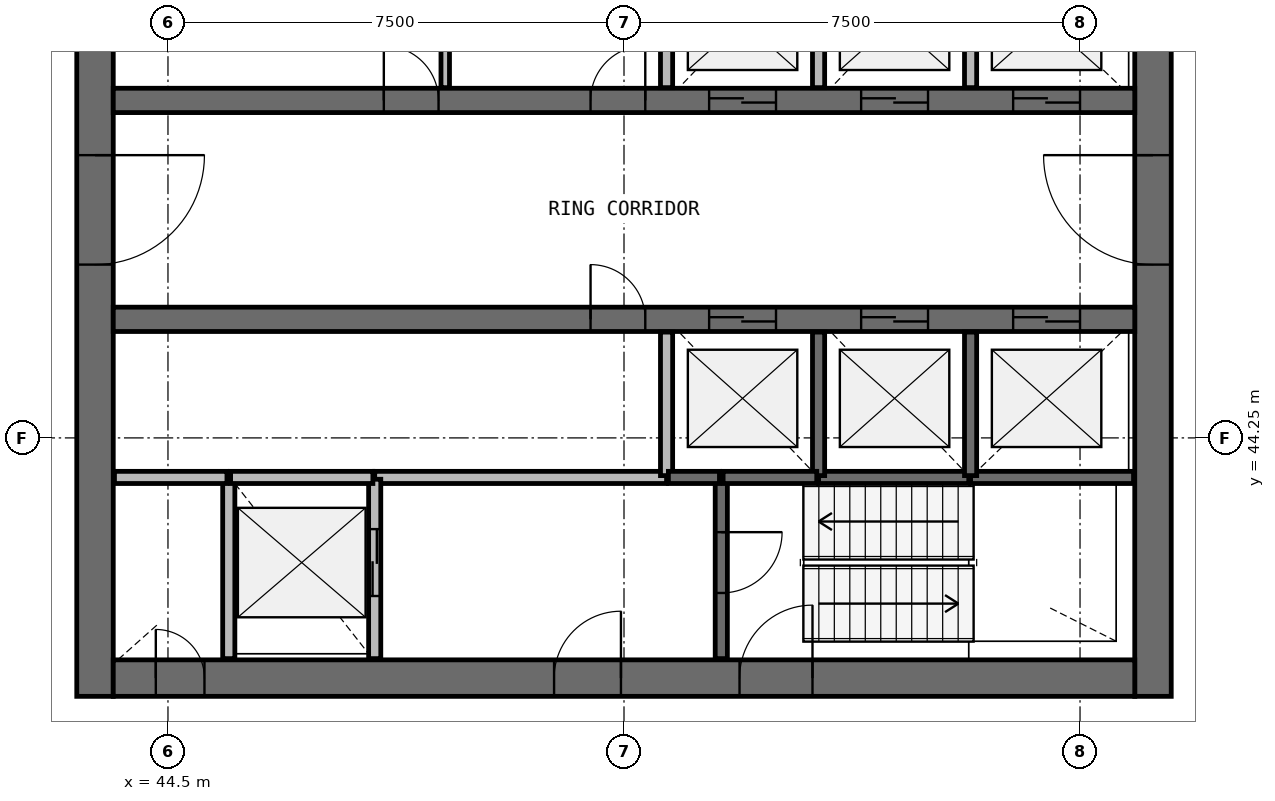
"""IFC4 building model, lengths in metres.
Left out: names, types, materials, properties, quantities, classifications, styles, units other than length and angle.
Written with IfcOpenShell. Run it as: python <this file> out.ifc"""

import sys

from ifc_helpers import new_model, si_unit, direction, frame, frame_2d, origin, place, context, subcontext, project, spatial, rectangle, extrude, source, transform, mapped, element, fill, save


model = new_model("IFC4")
c1 = context("Model", 3, precision=1e-05, world=origin(), true_north=direction((0.0, 1.0)))
c2 = subcontext(c1, "Body", "Model", "MODEL_VIEW")
j1 = project(units=[si_unit("LENGTHUNIT", "METRE"), si_unit("PLANEANGLEUNIT", "RADIAN")], contexts=[c1])
p1 = place(None, origin())
s1 = spatial("IfcSite", under=j1, at=p1, CompositionType="ELEMENT")
p2 = place(p1, origin())
s2 = spatial("IfcBuilding", under=s1, at=p2, CompositionType="ELEMENT")
p3 = place(p2, frame((0.0, 0.0, 183.8)))
s3 = spatial("IfcBuildingStorey", under=s2, at=p3, CompositionType="ELEMENT", Elevation=183.8)
p4 = place(p3, frame((60.7, 40.0, 0.0), z_axis=(0.0, 0.0, 1.0), x_axis=(0.0, 1.0, 0.0)))
e1 = element("IfcWall", 1, at=p4, inside=s3, PredefinedType="SHEAR", context=c2, shape_type="SweptSolid", body=[
    extrude(rectangle(XDim=16.0, YDim=0.6, at=frame_2d((8.0, 0.0))), origin(), (0.0, 0.0, 1.0), 3.9),
])
p5 = place(p4, frame((7.1, 0.0, 0.0)))
e2 = element("IfcOpeningElement", 2, at=p5, cuts=e1, PredefinedType="OPENING", context=c2, shape_type="SweptSolid", body=[
    extrude(rectangle(XDim=1.8, YDim=2.1, at=frame_2d((0.9, 1.05))), frame((0.0, 0.31, 0.0), z_axis=(0.0, -1.0, 0.0), x_axis=(1.0, 0.0, 0.0)), (0.0, 0.0, 1.0), 0.62),
])
p6 = place(p3, frame((43.3, 56.0, 0.0), z_axis=(0.0, 0.0, 1.0), x_axis=(0.0, -1.0, 0.0)))
e3 = element("IfcWall", 3, at=p6, inside=s3, PredefinedType="SHEAR", context=c2, shape_type="SweptSolid", body=[
    extrude(rectangle(XDim=16.0, YDim=0.6, at=frame_2d((8.0, 0.0))), origin(), (0.0, 0.0, 1.0), 3.9),
])
p7 = place(p6, frame((7.1, 0.0, 0.0)))
e4 = element("IfcOpeningElement", 4, at=p7, cuts=e3, PredefinedType="OPENING", context=c2, shape_type="SweptSolid", body=[
    extrude(rectangle(XDim=1.8, YDim=2.1, at=frame_2d((0.9, 1.05))), frame((0.0, 0.31, 0.0), z_axis=(0.0, -1.0, 0.0), x_axis=(1.0, 0.0, 0.0)), (0.0, 0.0, 1.0), 0.62),
])
p8 = place(p3, frame((43.6, 40.3, 0.0), z_axis=(0.0, 0.0, 1.0), x_axis=(1.0, 0.0, 0.0)))
e5 = element("IfcWall", 5, at=p8, inside=s3, PredefinedType="SHEAR", context=c2, shape_type="SweptSolid", body=[
    extrude(rectangle(XDim=16.8, YDim=0.6, at=frame_2d((8.4, 0.0))), origin(), (0.0, 0.0, 1.0), 3.9),
])
p9 = place(p8, frame((10.3, 0.0, 0.0)))
e6 = element("IfcOpeningElement", 6, at=p9, cuts=e5, PredefinedType="OPENING", context=c2, shape_type="SweptSolid", body=[
    extrude(rectangle(XDim=1.2, YDim=2.1, at=frame_2d((0.6, 1.05))), frame((0.0, 0.31, 0.0), z_axis=(0.0, -1.0, 0.0), x_axis=(1.0, 0.0, 0.0)), (0.0, 0.0, 1.0), 0.62),
])
p10 = place(p8, frame((7.25, 0.0, 0.0)))
e7 = element("IfcOpeningElement", 7, at=p10, cuts=e5, PredefinedType="OPENING", context=c2, shape_type="SweptSolid", body=[
    extrude(rectangle(XDim=1.1, YDim=2.1, at=frame_2d((0.55, 1.05))), frame((0.0, 0.31, 0.0), z_axis=(0.0, -1.0, 0.0), x_axis=(1.0, 0.0, 0.0)), (0.0, 0.0, 1.0), 0.62),
])
p11 = place(p8, frame((0.7, 0.0, 0.0)))
e8 = element("IfcOpeningElement", 8, at=p11, cuts=e5, PredefinedType="OPENING", context=c2, shape_type="SweptSolid", body=[
    extrude(rectangle(XDim=0.8, YDim=2.1, at=frame_2d((0.4, 1.05))), frame((0.0, 0.31, 0.0), z_axis=(0.0, -1.0, 0.0), x_axis=(1.0, 0.0, 0.0)), (0.0, 0.0, 1.0), 0.62),
])
p12 = place(p3, frame((43.6, 49.8, 0.0), z_axis=(0.0, 0.0, 1.0), x_axis=(1.0, 0.0, 0.0)))
e9 = element("IfcWall", 9, at=p12, inside=s3, PredefinedType="SHEAR", context=c2, shape_type="SweptSolid", body=[
    extrude(rectangle(XDim=16.8, YDim=0.4, at=frame_2d((8.4, 0.0))), origin(), (0.0, 0.0, 1.0), 3.9),
])
p13 = place(p12, frame((9.8, 0.0, 0.0)))
e10 = element("IfcOpeningElement", 10, at=p13, cuts=e9, PredefinedType="OPENING", context=c2, shape_type="SweptSolid", body=[
    extrude(rectangle(XDim=1.1, YDim=2.1, at=frame_2d((0.55, 1.05))), frame((0.0, 0.21, 0.0), z_axis=(0.0, -1.0, 0.0), x_axis=(1.0, 0.0, 0.0)), (0.0, 0.0, 1.0), 0.42),
])
p14 = place(p12, frame((12.3, 0.0, 0.0)))
e11 = element("IfcOpeningElement", 11, at=p14, cuts=e9, PredefinedType="OPENING", context=c2, shape_type="SweptSolid", body=[
    extrude(rectangle(XDim=1.1, YDim=2.1, at=frame_2d((0.55, 1.05))), frame((0.0, 0.21, 0.0), z_axis=(0.0, -1.0, 0.0), x_axis=(1.0, 0.0, 0.0)), (0.0, 0.0, 1.0), 0.42),
])
p15 = place(p12, frame((14.8, 0.0, 0.0)))
e12 = element("IfcOpeningElement", 12, at=p15, cuts=e9, PredefinedType="OPENING", context=c2, shape_type="SweptSolid", body=[
    extrude(rectangle(XDim=1.1, YDim=2.1, at=frame_2d((0.55, 1.05))), frame((0.0, 0.21, 0.0), z_axis=(0.0, -1.0, 0.0), x_axis=(1.0, 0.0, 0.0)), (0.0, 0.0, 1.0), 0.42),
])
p16 = place(p12, frame((4.45, 0.0, 0.0)))
e13 = element("IfcOpeningElement", 13, at=p16, cuts=e9, PredefinedType="OPENING", context=c2, shape_type="SweptSolid", body=[
    extrude(rectangle(XDim=0.9, YDim=2.1, at=frame_2d((0.45, 1.05))), frame((0.0, 0.21, 0.0), z_axis=(0.0, -1.0, 0.0), x_axis=(1.0, 0.0, 0.0)), (0.0, 0.0, 1.0), 0.42),
])
p17 = place(p12, frame((7.85, 0.0, 0.0)))
e14 = element("IfcOpeningElement", 14, at=p17, cuts=e9, PredefinedType="OPENING", context=c2, shape_type="SweptSolid", body=[
    extrude(rectangle(XDim=0.9, YDim=2.1, at=frame_2d((0.45, 1.05))), frame((0.0, 0.21, 0.0), z_axis=(0.0, -1.0, 0.0), x_axis=(1.0, 0.0, 0.0)), (0.0, 0.0, 1.0), 0.42),
])
p18 = place(p3, frame((43.6, 46.2, 0.0), z_axis=(0.0, 0.0, 1.0), x_axis=(1.0, 0.0, 0.0)))
e15 = element("IfcWall", 15, at=p18, inside=s3, PredefinedType="SHEAR", context=c2, shape_type="SweptSolid", body=[
    extrude(rectangle(XDim=16.8, YDim=0.4, at=frame_2d((8.4, 0.0))), origin(), (0.0, 0.0, 1.0), 3.9),
])
p19 = place(p18, frame((9.8, 0.0, 0.0)))
e16 = element("IfcOpeningElement", 16, at=p19, cuts=e15, PredefinedType="OPENING", context=c2, shape_type="SweptSolid", body=[
    extrude(rectangle(XDim=1.1, YDim=2.1, at=frame_2d((0.55, 1.05))), frame((0.0, 0.21, 0.0), z_axis=(0.0, -1.0, 0.0), x_axis=(1.0, 0.0, 0.0)), (0.0, 0.0, 1.0), 0.42),
])
p20 = place(p18, frame((12.3, 0.0, 0.0)))
e17 = element("IfcOpeningElement", 17, at=p20, cuts=e15, PredefinedType="OPENING", context=c2, shape_type="SweptSolid", body=[
    extrude(rectangle(XDim=1.1, YDim=2.1, at=frame_2d((0.55, 1.05))), frame((0.0, 0.21, 0.0), z_axis=(0.0, -1.0, 0.0), x_axis=(1.0, 0.0, 0.0)), (0.0, 0.0, 1.0), 0.42),
])
p21 = place(p18, frame((14.8, 0.0, 0.0)))
e18 = element("IfcOpeningElement", 18, at=p21, cuts=e15, PredefinedType="OPENING", context=c2, shape_type="SweptSolid", body=[
    extrude(rectangle(XDim=1.1, YDim=2.1, at=frame_2d((0.55, 1.05))), frame((0.0, 0.21, 0.0), z_axis=(0.0, -1.0, 0.0), x_axis=(1.0, 0.0, 0.0)), (0.0, 0.0, 1.0), 0.42),
])
p22 = place(p18, frame((7.85, 0.0, 0.0)))
e19 = element("IfcOpeningElement", 19, at=p22, cuts=e15, PredefinedType="OPENING", context=c2, shape_type="SweptSolid", body=[
    extrude(rectangle(XDim=0.9, YDim=2.1, at=frame_2d((0.45, 1.05))), frame((0.0, 0.21, 0.0), z_axis=(0.0, -1.0, 0.0), x_axis=(1.0, 0.0, 0.0)), (0.0, 0.0, 1.0), 0.42),
])
p23 = place(p3, frame((52.7, 43.6, 0.0), z_axis=(0.0, 0.0, 1.0), x_axis=(-1.0, 0.0, 0.0)))
e20 = element("IfcWall", 20, at=p23, inside=s3, PredefinedType="SOLIDWALL", context=c2, shape_type="SweptSolid", body=[
    extrude(rectangle(XDim=4.8, YDim=0.2, at=frame_2d((2.4, 0.0))), origin(), (0.0, 0.0, 1.0), 3.58),
])
p24 = place(p3, frame((45.5, 43.6, 0.0), z_axis=(0.0, 0.0, 1.0), x_axis=(0.0, -1.0, 0.0)))
e21 = element("IfcWall", 21, at=p24, inside=s3, PredefinedType="SOLIDWALL", context=c2, shape_type="SweptSolid", body=[
    extrude(rectangle(XDim=2.98, YDim=0.2, at=frame_2d((1.49, 0.0))), origin(), (0.0, 0.0, 1.0), 3.58),
])
p25 = place(p3, frame((47.9, 40.62, 0.0), z_axis=(0.0, 0.0, 1.0), x_axis=(0.0, 1.0, 0.0)))
e22 = element("IfcWall", 22, at=p25, inside=s3, PredefinedType="SOLIDWALL", context=c2, shape_type="SweptSolid", body=[
    extrude(rectangle(XDim=2.95, YDim=0.2, at=frame_2d((1.475, 0.0))), origin(), (0.0, 0.0, 1.0), 3.58),
])
p26 = place(p25, frame((1.03, 0.0, 0.0)))
e23 = element("IfcOpeningElement", 23, at=p26, cuts=e22, PredefinedType="OPENING", context=c2, shape_type="SweptSolid", body=[
    extrude(rectangle(XDim=1.1, YDim=2.1, at=frame_2d((0.55, 1.05))), frame((0.0, 0.11, 0.0), z_axis=(0.0, -1.0, 0.0), x_axis=(1.0, 0.0, 0.0)), (0.0, 0.0, 1.0), 0.22),
])
p27 = place(p3, frame((53.6, 43.6, 0.0), z_axis=(0.0, 0.0, 1.0), x_axis=(0.0, -1.0, 0.0)))
e24 = element("IfcWall", 24, at=p27, inside=s3, PredefinedType="SOLIDWALL", context=c2, shape_type="SweptSolid", body=[
    extrude(rectangle(XDim=2.98, YDim=0.2, at=frame_2d((1.49, 0.0))), origin(), (0.0, 0.0, 1.0), 3.58),
])
p28 = place(p27, frame((0.9, 0.0, 0.0)))
e25 = element("IfcOpeningElement", 25, at=p28, cuts=e24, PredefinedType="OPENING", context=c2, shape_type="SweptSolid", body=[
    extrude(rectangle(XDim=1.0, YDim=2.1, at=frame_2d((0.5, 1.05))), frame((0.0, 0.11, 0.0), z_axis=(0.0, -1.0, 0.0), x_axis=(1.0, 0.0, 0.0)), (0.0, 0.0, 1.0), 0.22),
])
p29 = place(p3, frame((57.7, 43.6, 0.0), z_axis=(0.0, 0.0, 1.0), x_axis=(1.0, 0.0, 0.0)))
e26 = element("IfcWall", 26, at=p29, inside=s3, PredefinedType="SOLIDWALL", context=c2, shape_type="SweptSolid", body=[
    extrude(rectangle(XDim=2.68, YDim=0.2, at=frame_2d((1.34, 0.0))), origin(), (0.0, 0.0, 1.0), 3.58),
])
p30 = place(p3, frame((55.2, 43.6, 0.0), z_axis=(0.0, 0.0, 1.0), x_axis=(1.0, 0.0, 0.0)))
e27 = element("IfcWall", 27, at=p30, inside=s3, PredefinedType="SOLIDWALL", context=c2, shape_type="SweptSolid", body=[
    extrude(rectangle(XDim=2.47, YDim=0.2, at=frame_2d((1.235, 0.0))), origin(), (0.0, 0.0, 1.0), 3.58),
])
p31 = place(p3, frame((47.87, 43.6, 0.0), z_axis=(0.0, 0.0, 1.0), x_axis=(-1.0, 0.0, 0.0)))
e28 = element("IfcWall", 28, at=p31, inside=s3, PredefinedType="SOLIDWALL", context=c2, shape_type="SweptSolid", body=[
    extrude(rectangle(XDim=2.34, YDim=0.2, at=frame_2d((1.17, 0.0))), origin(), (0.0, 0.0, 1.0), 3.58),
])
for number, where, z_axis, x_axis in (
    (29, (52.7, 45.99, 0.0), (0.0, 0.0, 1.0), (0.0, -1.0, 0.0)),
    (30, (52.7, 52.37, 0.0), (0.0, 0.0, 1.0), (0.0, -1.0, 0.0)),
    (31, (55.2, 43.63, 0.0), (0.0, 0.0, 1.0), (0.0, 1.0, 0.0)),
    (32, (55.2, 50.01, 0.0), (0.0, 0.0, 1.0), (0.0, 1.0, 0.0)),
    (33, (57.7, 43.63, 0.0), (0.0, 0.0, 1.0), (0.0, 1.0, 0.0)),
):
    element("IfcWall", number, at=place(p3, frame(where, z_axis=z_axis, x_axis=x_axis)), inside=s3, PredefinedType="SOLIDWALL", context=c2, shape_type="SweptSolid", body=[
        extrude(rectangle(XDim=2.36, YDim=0.2, at=frame_2d((1.18, 0.0))), origin(), (0.0, 0.0, 1.0), 3.58),
    ])
p32 = place(p3, frame((57.7, 50.01, 0.0), z_axis=(0.0, 0.0, 1.0), x_axis=(0.0, 1.0, 0.0)))
e34 = element("IfcWall", 34, at=p32, inside=s3, PredefinedType="SOLIDWALL", context=c2, shape_type="SweptSolid", body=[
    extrude(rectangle(XDim=2.39, YDim=0.2, at=frame_2d((1.195, 0.0))), origin(), (0.0, 0.0, 1.0), 3.58),
])
p33 = place(p3, frame((45.47, 43.6, 0.0), z_axis=(0.0, 0.0, 1.0), x_axis=(-1.0, 0.0, 0.0)))
e35 = element("IfcWall", 35, at=p33, inside=s3, PredefinedType="SOLIDWALL", context=c2, shape_type="SweptSolid", body=[
    extrude(rectangle(XDim=1.85, YDim=0.2, at=frame_2d((0.925, 0.0))), origin(), (0.0, 0.0, 1.0), 3.58),
])
p34 = place(p3, frame((53.63, 43.6, 0.0), z_axis=(0.0, 0.0, 1.0), x_axis=(1.0, 0.0, 0.0)))
e36 = element("IfcWall", 36, at=p34, inside=s3, PredefinedType="SOLIDWALL", context=c2, shape_type="SweptSolid", body=[
    extrude(rectangle(XDim=1.54, YDim=0.2, at=frame_2d((0.77, 0.0))), origin(), (0.0, 0.0, 1.0), 3.58),
])
p35 = place(p3, frame((52.73, 43.6, 0.0), z_axis=(0.0, 0.0, 1.0), x_axis=(1.0, 0.0, 0.0)))
e37 = element("IfcWall", 37, at=p35, inside=s3, PredefinedType="SOLIDWALL", context=c2, shape_type="SweptSolid", body=[
    extrude(rectangle(XDim=0.84, YDim=0.2, at=frame_2d((0.42, 0.0))), origin(), (0.0, 0.0, 1.0), 3.58),
])
p36 = place(p3, frame((49.06, 50.01, 0.0), z_axis=(0.0, 0.0, 1.0), x_axis=(0.0, 1.0, 0.0)))
e38 = element("IfcWall", 38, at=p36, inside=s3, PredefinedType="PARTITIONING", context=c2, shape_type="SweptSolid", body=[
    extrude(rectangle(XDim=2.29, YDim=0.14, at=frame_2d((1.145, 0.0))), origin(), (0.0, 0.0, 1.0), 2.88),
])
m1 = source(origin(), c2, "Body", "SweptSolid", [
    extrude(rectangle(XDim=1.8, YDim=2.1, at=frame_2d((0.9, 1.05))), frame((0.0, 0.025, 0.0), z_axis=(0.0, -1.0, 0.0), x_axis=(1.0, 0.0, 0.0)), (0.0, 0.0, 1.0), 0.05),
])
p37 = place(p7, origin())
e39 = element("IfcDoor", 39, at=p37, inside=s3, OperationType="SINGLE_SWING_LEFT", PredefinedType="DOOR", context=c2, shape_type="MappedRepresentation", body=[
    mapped(m1, transform((0.0, 0.0, 0.0), scale=1.0)),
])
fill(e4, e39)
p38 = place(p5, origin())
e40 = element("IfcDoor", 40, at=p38, inside=s3, OperationType="SINGLE_SWING_RIGHT", PredefinedType="DOOR", context=c2, shape_type="MappedRepresentation", body=[
    mapped(m1, transform((0.0, 0.0, 0.0), scale=1.0)),
])
fill(e2, e40)
m2 = source(origin(), c2, "Body", "SweptSolid", [
    extrude(rectangle(XDim=1.1, YDim=2.1, at=frame_2d((0.55, 1.05))), frame((0.0, 0.025, 0.0), z_axis=(0.0, -1.0, 0.0), x_axis=(1.0, 0.0, 0.0)), (0.0, 0.0, 1.0), 0.05),
])
p39 = place(p13, origin())
e41 = element("IfcDoor", 41, at=p39, inside=s3, OperationType="DOUBLE_DOOR_SLIDING", PredefinedType="USERDEFINED", context=c2, shape_type="MappedRepresentation", body=[
    mapped(m2, transform((0.0, 0.0, 0.0), scale=1.0)),
])
fill(e10, e41)
p40 = place(p14, origin())
e42 = element("IfcDoor", 42, at=p40, inside=s3, OperationType="DOUBLE_DOOR_SLIDING", PredefinedType="USERDEFINED", context=c2, shape_type="MappedRepresentation", body=[
    mapped(m2, transform((0.0, 0.0, 0.0), scale=1.0)),
])
fill(e11, e42)
p41 = place(p15, origin())
e43 = element("IfcDoor", 43, at=p41, inside=s3, OperationType="DOUBLE_DOOR_SLIDING", PredefinedType="USERDEFINED", context=c2, shape_type="MappedRepresentation", body=[
    mapped(m2, transform((0.0, 0.0, 0.0), scale=1.0)),
])
fill(e12, e43)
p42 = place(p19, origin())
e44 = element("IfcDoor", 44, at=p42, inside=s3, OperationType="DOUBLE_DOOR_SLIDING", PredefinedType="USERDEFINED", context=c2, shape_type="MappedRepresentation", body=[
    mapped(m2, transform((0.0, 0.0, 0.0), scale=1.0)),
])
fill(e16, e44)
p43 = place(p20, origin())
e45 = element("IfcDoor", 45, at=p43, inside=s3, OperationType="DOUBLE_DOOR_SLIDING", PredefinedType="USERDEFINED", context=c2, shape_type="MappedRepresentation", body=[
    mapped(m2, transform((0.0, 0.0, 0.0), scale=1.0)),
])
fill(e17, e45)
p44 = place(p21, origin())
e46 = element("IfcDoor", 46, at=p44, inside=s3, OperationType="DOUBLE_DOOR_SLIDING", PredefinedType="USERDEFINED", context=c2, shape_type="MappedRepresentation", body=[
    mapped(m2, transform((0.0, 0.0, 0.0), scale=1.0)),
])
fill(e18, e46)
p45 = place(p26, origin())
e47 = element("IfcDoor", 47, at=p45, inside=s3, OperationType="DOUBLE_DOOR_SLIDING", PredefinedType="USERDEFINED", context=c2, shape_type="MappedRepresentation", body=[
    mapped(m2, transform((0.0, 0.0, 0.0), scale=1.0)),
])
fill(e23, e47)
m3 = source(origin(), c2, "Body", "SweptSolid", [
    extrude(rectangle(XDim=1.2, YDim=2.1, at=frame_2d((0.6, 1.05))), frame((0.0, 0.025, 0.0), z_axis=(0.0, -1.0, 0.0), x_axis=(1.0, 0.0, 0.0)), (0.0, 0.0, 1.0), 0.05),
])
p46 = place(p9, origin())
e48 = element("IfcDoor", 48, at=p46, inside=s3, OperationType="SINGLE_SWING_RIGHT", PredefinedType="DOOR", context=c2, shape_type="MappedRepresentation", body=[
    mapped(m3, transform((0.0, 0.0, 0.0), scale=1.0)),
])
fill(e6, e48)
m4 = source(origin(), c2, "Body", "SweptSolid", [
    extrude(rectangle(XDim=1.0, YDim=2.1, at=frame_2d((0.5, 1.05))), frame((0.0, 0.025, 0.0), z_axis=(0.0, -1.0, 0.0), x_axis=(1.0, 0.0, 0.0)), (0.0, 0.0, 1.0), 0.05),
])
p47 = place(p28, origin())
e49 = element("IfcDoor", 49, at=p47, inside=s3, OperationType="SINGLE_SWING_LEFT", PredefinedType="DOOR", context=c2, shape_type="MappedRepresentation", body=[
    mapped(m4, transform((0.0, 0.0, 0.0), scale=1.0)),
])
fill(e25, e49)
m5 = source(origin(), c2, "Body", "SweptSolid", [
    extrude(rectangle(XDim=1.1, YDim=2.1, at=frame_2d((0.55, 1.05))), frame((0.0, 0.025, 0.0), z_axis=(0.0, -1.0, 0.0), x_axis=(1.0, 0.0, 0.0)), (0.0, 0.0, 1.0), 0.05),
])
p48 = place(p10, origin())
e50 = element("IfcDoor", 50, at=p48, inside=s3, OperationType="SINGLE_SWING_RIGHT", PredefinedType="DOOR", context=c2, shape_type="MappedRepresentation", body=[
    mapped(m5, transform((0.0, 0.0, 0.0), scale=1.0)),
])
fill(e7, e50)
m6 = source(origin(), c2, "Body", "SweptSolid", [
    extrude(rectangle(XDim=0.8, YDim=2.1, at=frame_2d((0.4, 1.05))), frame((0.0, 0.025, 0.0), z_axis=(0.0, -1.0, 0.0), x_axis=(1.0, 0.0, 0.0)), (0.0, 0.0, 1.0), 0.05),
])
p49 = place(p11, origin())
e51 = element("IfcDoor", 51, at=p49, inside=s3, OperationType="SINGLE_SWING_LEFT", PredefinedType="DOOR", context=c2, shape_type="MappedRepresentation", body=[
    mapped(m6, transform((0.0, 0.0, 0.0), scale=1.0)),
])
fill(e8, e51)
m7 = source(origin(), c2, "Body", "SweptSolid", [
    extrude(rectangle(XDim=0.9, YDim=2.1, at=frame_2d((0.45, 1.05))), frame((0.0, 0.025, 0.0), z_axis=(0.0, -1.0, 0.0), x_axis=(1.0, 0.0, 0.0)), (0.0, 0.0, 1.0), 0.05),
])
p50 = place(p16, origin())
e52 = element("IfcDoor", 52, at=p50, inside=s3, OperationType="SINGLE_SWING_LEFT", PredefinedType="DOOR", context=c2, shape_type="MappedRepresentation", body=[
    mapped(m7, transform((0.0, 0.0, 0.0), scale=1.0)),
])
fill(e13, e52)
p51 = place(p17, origin())
e53 = element("IfcDoor", 53, at=p51, inside=s3, OperationType="SINGLE_SWING_RIGHT", PredefinedType="DOOR", context=c2, shape_type="MappedRepresentation", body=[
    mapped(m7, transform((0.0, 0.0, 0.0), scale=1.0)),
])
fill(e14, e53)
p52 = place(p22, origin())
e54 = element("IfcDoor", 54, at=p52, inside=s3, OperationType="SINGLE_SWING_LEFT", PredefinedType="DOOR", context=c2, shape_type="MappedRepresentation", body=[
    mapped(m7, transform((0.0, 0.0, 0.0), scale=1.0)),
])
fill(e19, e54)
save(model, sys.argv[1])
